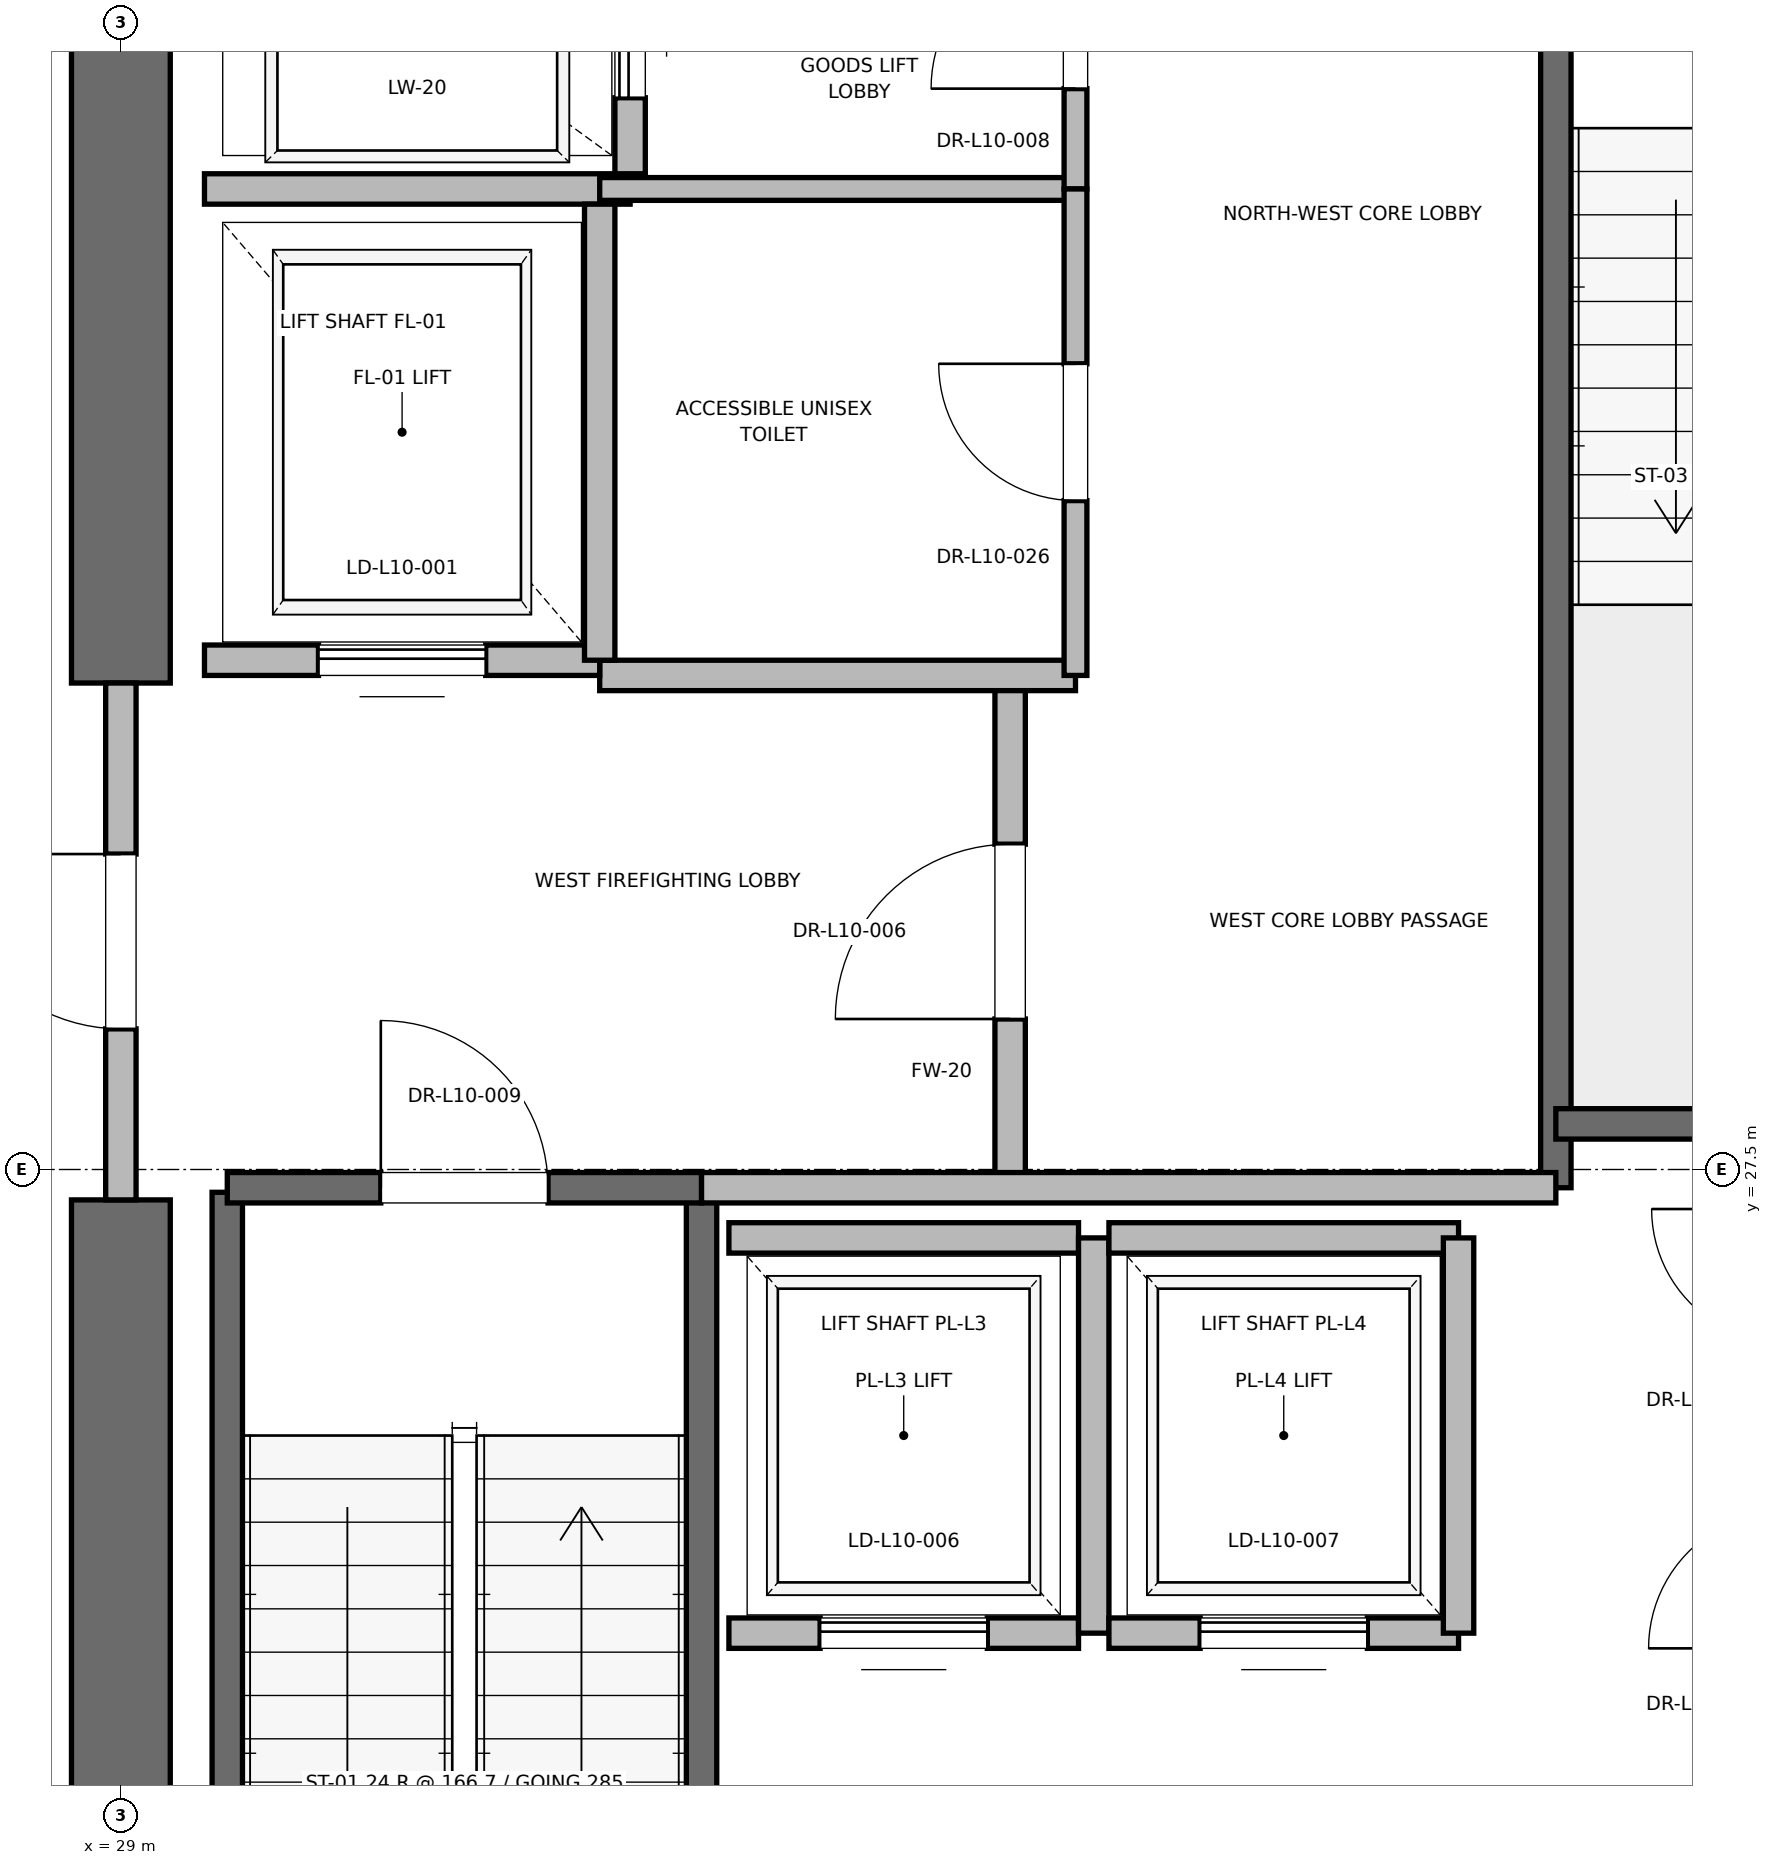
"""IFC4 building model, lengths in metres.
Left out: names, types, materials, properties, quantities, classifications, styles, units other than length and angle.
Written with IfcOpenShell. Run it as: python <this file> out.ifc"""

import sys

from ifc_helpers import new_model, si_unit, direction, frame, frame_2d, origin, place, context, subcontext, project, spatial, rectangle, extrude, element, fill, save


model = new_model("IFC4")
c1 = context("Model", 3, precision=1e-05, world=origin(), true_north=direction((0.0, 1.0)))
c2 = subcontext(c1, "Body", "Model", "MODEL_VIEW")
j1 = project(units=[si_unit("LENGTHUNIT", "METRE"), si_unit("PLANEANGLEUNIT", "RADIAN")], contexts=[c1])
p1 = place(None, origin())
s1 = spatial("IfcSite", under=j1, at=p1, CompositionType="ELEMENT")
p2 = place(p1, origin())
s2 = spatial("IfcBuilding", under=s1, at=p2, CompositionType="ELEMENT")
p3 = place(p2, frame((0.0, 0.0, 47.6)))
s3 = spatial("IfcBuildingStorey", under=s2, at=p3, CompositionType="ELEMENT", Elevation=47.6)
p4 = place(p3, frame((29.0, 18.5, 0.0), z_axis=(0.0, 0.0, 1.0), x_axis=(0.0, 1.0, 0.0)))
e1 = element("IfcWall", 1, at=p4, inside=s3, PredefinedType="SHEAR", context=c2, shape_type="SweptSolid", body=[
    extrude(rectangle(XDim=8.8, YDim=0.65, at=frame_2d((4.4, 0.0))), origin(), (0.0, 0.0, 1.0), 3.76),
])
p5 = place(p3, frame((29.0, 30.7, 0.0), z_axis=(0.0, 0.0, 1.0), x_axis=(0.0, 1.0, 0.0)))
e2 = element("IfcWall", 2, at=p5, inside=s3, PredefinedType="SHEAR", context=c2, shape_type="SweptSolid", body=[
    extrude(rectangle(XDim=5.8, YDim=0.65, at=frame_2d((2.9, 0.0))), origin(), (0.0, 0.0, 1.0), 3.76),
])
p6 = place(p3, frame((29.7, 19.2, 0.0), z_axis=(0.0, 0.0, 1.0), x_axis=(0.0, 1.0, 0.0)))
e3 = element("IfcWall", 3, at=p6, inside=s3, PredefinedType="SOLIDWALL", context=c2, shape_type="SweptSolid", body=[
    extrude(rectangle(XDim=8.15, YDim=0.2, at=frame_2d((4.075, 0.0))), origin(), (0.0, 0.0, 1.0), 3.76),
])
p7 = place(p3, frame((32.82, 18.6, 0.0), z_axis=(0.0, 0.0, 1.0), x_axis=(0.0, 1.0, 0.0)))
e4 = element("IfcWall", 4, at=p7, inside=s3, PredefinedType="SOLIDWALL", context=c2, shape_type="SweptSolid", body=[
    extrude(rectangle(XDim=8.78, YDim=0.2, at=frame_2d((4.39, 0.0))), origin(), (0.0, 0.0, 1.0), 3.76),
])
p8 = place(p3, frame((29.7, 27.38, 0.0), z_axis=(0.0, 0.0, 1.0), x_axis=(1.0, 0.0, 0.0)))
e5 = element("IfcWall", 5, at=p8, inside=s3, PredefinedType="SOLIDWALL", context=c2, shape_type="SweptSolid", body=[
    extrude(rectangle(XDim=3.12, YDim=0.2, at=frame_2d((1.56, 0.0))), origin(), (0.0, 0.0, 1.0), 3.76),
])
p9 = place(p8, frame((1.01, 0.0, 0.0)))
e6 = element("IfcOpeningElement", 6, at=p9, cuts=e5, PredefinedType="OPENING", context=c2, shape_type="SweptSolid", body=[
    extrude(rectangle(XDim=1.1, YDim=2.15, at=frame_2d((0.55, 1.075))), frame((0.0, 0.1, 0.0), z_axis=(0.0, -1.0, 0.0), x_axis=(1.0, 0.0, 0.0)), (0.0, 0.0, 1.0), 0.2),
])
p10 = place(p3, frame((38.44, 27.38, 0.0), z_axis=(0.0, 0.0, 1.0), x_axis=(0.0, 1.0, 0.0)))
e7 = element("IfcWall", 7, at=p10, inside=s3, PredefinedType="SOLIDWALL", context=c2, shape_type="SweptSolid", body=[
    extrude(rectangle(XDim=8.87, YDim=0.2, at=frame_2d((4.435, 0.0))), origin(), (0.0, 0.0, 1.0), 3.76),
])
p11 = place(p3, frame((38.44, 27.8, 0.0), z_axis=(0.0, 0.0, 1.0), x_axis=(1.0, 0.0, 0.0)))
e8 = element("IfcWall", 8, at=p11, inside=s3, PredefinedType="SOLIDWALL", context=c2, shape_type="SweptSolid", body=[
    extrude(rectangle(XDim=3.32, YDim=0.2, at=frame_2d((1.66, 0.0))), origin(), (0.0, 0.0, 1.0), 3.76),
])
p12 = place(p3, frame((34.85, 27.38, 0.0), z_axis=(0.0, 0.0, 1.0), x_axis=(0.0, 1.0, 0.0)))
e9 = element("IfcWall", 9, at=p12, inside=s3, PredefinedType="PARTITIONING", context=c2, shape_type="SweptSolid", body=[
    extrude(rectangle(XDim=3.37, YDim=0.2, at=frame_2d((1.685, 0.0))), origin(), (0.0, 0.0, 1.0), 3.76),
])
p13 = place(p12, frame((1.11, 0.0, 0.0)))
e10 = element("IfcOpeningElement", 10, at=p13, cuts=e9, PredefinedType="OPENING", context=c2, shape_type="SweptSolid", body=[
    extrude(rectangle(XDim=1.15, YDim=2.2, at=frame_2d((0.575, 1.1))), frame((0.0, 0.1, 0.0), z_axis=(0.0, -1.0, 0.0), x_axis=(1.0, 0.0, 0.0)), (0.0, 0.0, 1.0), 0.2),
])
p14 = place(p3, frame((29.0, 27.3, 0.0), z_axis=(0.0, 0.0, 1.0), x_axis=(0.0, 1.0, 0.0)))
e11 = element("IfcWall", 11, at=p14, inside=s3, PredefinedType="PARTITIONING", context=c2, shape_type="SweptSolid", body=[
    extrude(rectangle(XDim=3.4, YDim=0.2, at=frame_2d((1.7, 0.0))), origin(), (0.0, 0.0, 1.0), 2.54),
])
p15 = place(p14, frame((1.125, 0.0, 0.0)))
e12 = element("IfcOpeningElement", 12, at=p15, cuts=e11, PredefinedType="OPENING", context=c2, shape_type="SweptSolid", body=[
    extrude(rectangle(XDim=1.15, YDim=2.2, at=frame_2d((0.575, 1.1))), frame((0.0, 0.1, 0.0), z_axis=(0.0, -1.0, 0.0), x_axis=(1.0, 0.0, 0.0)), (0.0, 0.0, 1.0), 0.2),
])
p16 = place(p3, frame((32.82, 27.38, 0.0), z_axis=(0.0, 0.0, 1.0), x_axis=(1.0, 0.0, 0.0)))
e13 = element("IfcWall", 13, at=p16, inside=s3, PredefinedType="PARTITIONING", context=c2, shape_type="SweptSolid", body=[
    extrude(rectangle(XDim=5.62, YDim=0.2, at=frame_2d((2.81, 0.0))), origin(), (0.0, 0.0, 1.0), 3.76),
])
p17 = place(p3, frame((32.15, 30.75, 0.0), z_axis=(0.0, 0.0, 1.0), x_axis=(1.0, 0.0, 0.0)))
e14 = element("IfcWall", 14, at=p17, inside=s3, PredefinedType="PARTITIONING", context=c2, shape_type="SweptSolid", body=[
    extrude(rectangle(XDim=3.13, YDim=0.2, at=frame_2d((1.565, 0.0))), origin(), (0.0, 0.0, 1.0), 3.76),
])
p18 = place(p3, frame((29.55, 30.85, 0.0), z_axis=(0.0, 0.0, 1.0), x_axis=(1.0, 0.0, 0.0)))
e15 = element("IfcWall", 15, at=p18, inside=s3, PredefinedType="SOLIDWALL", context=c2, shape_type="SweptSolid", body=[
    extrude(rectangle(XDim=2.6, YDim=0.2, at=frame_2d((1.3, 0.0))), origin(), (0.0, 0.0, 1.0), 2.54),
])
p19 = place(p18, frame((0.75, 0.0, 0.0)))
e16 = element("IfcOpeningElement", 16, at=p19, cuts=e15, PredefinedType="OPENING", context=c2, shape_type="SweptSolid", body=[
    extrude(rectangle(XDim=1.1, YDim=2.2, at=frame_2d((0.55, 1.1))), frame((0.0, 0.1, 0.0), z_axis=(0.0, -1.0, 0.0), x_axis=(1.0, 0.0, 0.0)), (0.0, 0.0, 1.0), 0.2),
])
p20 = place(p3, frame((29.55, 33.95, 0.0), z_axis=(0.0, 0.0, 1.0), x_axis=(1.0, 0.0, 0.0)))
e17 = element("IfcWall", 17, at=p20, inside=s3, PredefinedType="SOLIDWALL", context=c2, shape_type="SweptSolid", body=[
    extrude(rectangle(XDim=2.8, YDim=0.2, at=frame_2d((1.4, 0.0))), origin(), (0.0, 0.0, 1.0), 3.76),
])
p21 = place(p3, frame((32.15, 30.85, 0.0), z_axis=(0.0, 0.0, 1.0), x_axis=(0.0, 1.0, 0.0)))
e18 = element("IfcWall", 18, at=p21, inside=s3, PredefinedType="SOLIDWALL", context=c2, shape_type="SweptSolid", body=[
    extrude(rectangle(XDim=3.0, YDim=0.2, at=frame_2d((1.5, 0.0))), origin(), (0.0, 0.0, 1.0), 3.76),
])
p22 = place(p3, frame((32.35, 34.05, 0.0), z_axis=(0.0, 0.0, 1.0), x_axis=(0.0, 1.0, 0.0)))
e19 = element("IfcWall", 19, at=p22, inside=s3, PredefinedType="SOLIDWALL", context=c2, shape_type="SweptSolid", body=[
    extrude(rectangle(XDim=2.1, YDim=0.2, at=frame_2d((1.05, 0.0))), origin(), (0.0, 0.0, 1.0), 3.76),
])
p23 = place(p22, frame((0.5, 0.0, 0.0)))
e20 = element("IfcOpeningElement", 20, at=p23, cuts=e19, PredefinedType="OPENING", context=c2, shape_type="SweptSolid", body=[
    extrude(rectangle(XDim=1.1, YDim=2.2, at=frame_2d((0.55, 1.1))), frame((0.0, 0.1, 0.0), z_axis=(0.0, -1.0, 0.0), x_axis=(1.0, 0.0, 0.0)), (0.0, 0.0, 1.0), 0.2),
])
p24 = place(p3, frame((33.0, 24.45, 0.0), z_axis=(0.0, 0.0, 1.0), x_axis=(1.0, 0.0, 0.0)))
e21 = element("IfcWall", 21, at=p24, inside=s3, PredefinedType="SOLIDWALL", context=c2, shape_type="SweptSolid", body=[
    extrude(rectangle(XDim=2.3, YDim=0.2, at=frame_2d((1.15, 0.0))), origin(), (0.0, 0.0, 1.0), 3.76),
])
p25 = place(p24, frame((0.6, 0.0, 0.0)))
e22 = element("IfcOpeningElement", 22, at=p25, cuts=e21, PredefinedType="OPENING", context=c2, shape_type="SweptSolid", body=[
    extrude(rectangle(XDim=1.1, YDim=2.2, at=frame_2d((0.55, 1.1))), frame((0.0, 0.1, 0.0), z_axis=(0.0, -1.0, 0.0), x_axis=(1.0, 0.0, 0.0)), (0.0, 0.0, 1.0), 0.2),
])
p26 = place(p3, frame((35.3, 27.05, 0.0), z_axis=(0.0, 0.0, 1.0), x_axis=(-1.0, 0.0, 0.0)))
e23 = element("IfcWall", 23, at=p26, inside=s3, PredefinedType="SOLIDWALL", context=c2, shape_type="SweptSolid", body=[
    extrude(rectangle(XDim=2.3, YDim=0.2, at=frame_2d((1.15, 0.0))), origin(), (0.0, 0.0, 1.0), 3.76),
])
p27 = place(p3, frame((35.4, 24.45, 0.0), z_axis=(0.0, 0.0, 1.0), x_axis=(0.0, 1.0, 0.0)))
e24 = element("IfcWall", 24, at=p27, inside=s3, PredefinedType="SOLIDWALL", context=c2, shape_type="SweptSolid", body=[
    extrude(rectangle(XDim=2.6, YDim=0.2, at=frame_2d((1.3, 0.0))), origin(), (0.0, 0.0, 1.0), 3.76),
])
p28 = place(p3, frame((35.5, 24.45, 0.0), z_axis=(0.0, 0.0, 1.0), x_axis=(1.0, 0.0, 0.0)))
e25 = element("IfcWall", 25, at=p28, inside=s3, PredefinedType="SOLIDWALL", context=c2, shape_type="SweptSolid", body=[
    extrude(rectangle(XDim=2.3, YDim=0.2, at=frame_2d((1.15, 0.0))), origin(), (0.0, 0.0, 1.0), 3.76),
])
p29 = place(p28, frame((0.6, 0.0, 0.0)))
e26 = element("IfcOpeningElement", 26, at=p29, cuts=e25, PredefinedType="OPENING", context=c2, shape_type="SweptSolid", body=[
    extrude(rectangle(XDim=1.1, YDim=2.2, at=frame_2d((0.55, 1.1))), frame((0.0, 0.1, 0.0), z_axis=(0.0, -1.0, 0.0), x_axis=(1.0, 0.0, 0.0)), (0.0, 0.0, 1.0), 0.2),
])
p30 = place(p3, frame((37.8, 27.05, 0.0), z_axis=(0.0, 0.0, 1.0), x_axis=(-1.0, 0.0, 0.0)))
e27 = element("IfcWall", 27, at=p30, inside=s3, PredefinedType="SOLIDWALL", context=c2, shape_type="SweptSolid", body=[
    extrude(rectangle(XDim=2.3, YDim=0.2, at=frame_2d((1.15, 0.0))), origin(), (0.0, 0.0, 1.0), 3.76),
])
p31 = place(p3, frame((37.8, 24.45, 0.0), z_axis=(0.0, 0.0, 1.0), x_axis=(0.0, 1.0, 0.0)))
e28 = element("IfcWall", 28, at=p31, inside=s3, PredefinedType="SOLIDWALL", context=c2, shape_type="SweptSolid", body=[
    extrude(rectangle(XDim=2.6, YDim=0.2, at=frame_2d((1.3, 0.0))), origin(), (0.0, 0.0, 1.0), 3.76),
])
p32 = place(p3, frame((32.15, 33.95, 0.0), z_axis=(0.0, 0.0, 1.0), x_axis=(1.0, 0.0, 0.0)))
e29 = element("IfcWall", 29, at=p32, inside=s3, PredefinedType="PARTITIONING", context=c2, shape_type="SweptSolid", body=[
    extrude(rectangle(XDim=3.13, YDim=0.15, at=frame_2d((1.565, 0.0))), origin(), (0.0, 0.0, 1.0), 2.85),
])
p33 = place(p3, frame((35.28, 33.95, 0.0), z_axis=(0.0, 0.0, 1.0), x_axis=(0.0, 1.0, 0.0)))
e30 = element("IfcWall", 30, at=p33, inside=s3, PredefinedType="PARTITIONING", context=c2, shape_type="SweptSolid", body=[
    extrude(rectangle(XDim=2.27, YDim=0.15, at=frame_2d((1.135, 0.0))), origin(), (0.0, 0.0, 1.0), 2.54),
])
p34 = place(p33, frame((0.66, 0.0, 0.0)))
e31 = element("IfcOpeningElement", 31, at=p34, cuts=e30, PredefinedType="OPENING", context=c2, shape_type="SweptSolid", body=[
    extrude(rectangle(XDim=0.95, YDim=2.15, at=frame_2d((0.475, 1.075))), frame((0.0, 0.075, 0.0), z_axis=(0.0, -1.0, 0.0), x_axis=(1.0, 0.0, 0.0)), (0.0, 0.0, 1.0), 0.15),
])
p35 = place(p3, frame((35.28, 30.75, 0.0), z_axis=(0.0, 0.0, 1.0), x_axis=(0.0, 1.0, 0.0)))
e32 = element("IfcWall", 32, at=p35, inside=s3, PredefinedType="PARTITIONING", context=c2, shape_type="SweptSolid", body=[
    extrude(rectangle(XDim=3.2, YDim=0.15, at=frame_2d((1.6, 0.0))), origin(), (0.0, 0.0, 1.0), 2.85),
])
p36 = place(p35, frame((1.15, 0.0, 0.0)))
e33 = element("IfcOpeningElement", 33, at=p36, cuts=e32, PredefinedType="OPENING", context=c2, shape_type="SweptSolid", body=[
    extrude(rectangle(XDim=0.9, YDim=2.1, at=frame_2d((0.45, 1.05))), frame((0.0, 0.075, 0.0), z_axis=(0.0, -1.0, 0.0), x_axis=(1.0, 0.0, 0.0)), (0.0, 0.0, 1.0), 0.15),
])
p37 = place(p9, origin())
e34 = element("IfcDoor", 34, at=p37, inside=s3, OperationType="SINGLE_SWING_LEFT", PredefinedType="DOOR", context=c2, shape_type="SweptSolid", body=[
    extrude(rectangle(XDim=1.1, YDim=2.15, at=frame_2d((0.55, 1.075))), frame((0.0, 0.025, 0.0), z_axis=(0.0, -1.0, 0.0), x_axis=(1.0, 0.0, 0.0)), (0.0, 0.0, 1.0), 0.05),
])
fill(e6, e34)
p38 = place(p13, origin())
e35 = element("IfcDoor", 35, at=p38, inside=s3, OperationType="SINGLE_SWING_LEFT", PredefinedType="DOOR", context=c2, shape_type="SweptSolid", body=[
    extrude(rectangle(XDim=1.15, YDim=2.2, at=frame_2d((0.575, 1.1))), frame((0.0, 0.025, 0.0), z_axis=(0.0, -1.0, 0.0), x_axis=(1.0, 0.0, 0.0)), (0.0, 0.0, 1.0), 0.05),
])
fill(e10, e35)
p39 = place(p15, origin())
e36 = element("IfcDoor", 36, at=p39, inside=s3, OperationType="SINGLE_SWING_RIGHT", PredefinedType="DOOR", context=c2, shape_type="SweptSolid", body=[
    extrude(rectangle(XDim=1.15, YDim=2.2, at=frame_2d((0.575, 1.1))), frame((0.0, 0.025, 0.0), z_axis=(0.0, -1.0, 0.0), x_axis=(1.0, 0.0, 0.0)), (0.0, 0.0, 1.0), 0.05),
])
fill(e12, e36)
p40 = place(p19, origin())
e37 = element("IfcDoor", 37, at=p40, inside=s3, OperationType="SLIDING_TO_RIGHT", PredefinedType="DOOR", context=c2, shape_type="SweptSolid", body=[
    extrude(rectangle(XDim=1.1, YDim=2.2, at=frame_2d((0.55, 1.1))), frame((0.0, 0.025, 0.0), z_axis=(0.0, -1.0, 0.0), x_axis=(1.0, 0.0, 0.0)), (0.0, 0.0, 1.0), 0.05),
])
fill(e16, e37)
p41 = place(p23, origin())
e38 = element("IfcDoor", 38, at=p41, inside=s3, OperationType="SLIDING_TO_RIGHT", PredefinedType="DOOR", context=c2, shape_type="SweptSolid", body=[
    extrude(rectangle(XDim=1.1, YDim=2.2, at=frame_2d((0.55, 1.1))), frame((0.0, 0.025, 0.0), z_axis=(0.0, -1.0, 0.0), x_axis=(1.0, 0.0, 0.0)), (0.0, 0.0, 1.0), 0.05),
])
fill(e20, e38)
p42 = place(p25, origin())
e39 = element("IfcDoor", 39, at=p42, inside=s3, OperationType="SLIDING_TO_RIGHT", PredefinedType="DOOR", context=c2, shape_type="SweptSolid", body=[
    extrude(rectangle(XDim=1.1, YDim=2.2, at=frame_2d((0.55, 1.1))), frame((0.0, 0.025, 0.0), z_axis=(0.0, -1.0, 0.0), x_axis=(1.0, 0.0, 0.0)), (0.0, 0.0, 1.0), 0.05),
])
fill(e22, e39)
p43 = place(p29, origin())
e40 = element("IfcDoor", 40, at=p43, inside=s3, OperationType="SLIDING_TO_RIGHT", PredefinedType="DOOR", context=c2, shape_type="SweptSolid", body=[
    extrude(rectangle(XDim=1.1, YDim=2.2, at=frame_2d((0.55, 1.1))), frame((0.0, 0.025, 0.0), z_axis=(0.0, -1.0, 0.0), x_axis=(1.0, 0.0, 0.0)), (0.0, 0.0, 1.0), 0.05),
])
fill(e26, e40)
p44 = place(p34, origin())
e41 = element("IfcDoor", 41, at=p44, inside=s3, OperationType="SINGLE_SWING_LEFT", PredefinedType="DOOR", context=c2, shape_type="SweptSolid", body=[
    extrude(rectangle(XDim=0.95, YDim=2.15, at=frame_2d((0.475, 1.075))), frame((0.0, 0.025, 0.0), z_axis=(0.0, -1.0, 0.0), x_axis=(1.0, 0.0, 0.0)), (0.0, 0.0, 1.0), 0.05),
])
fill(e31, e41)
p45 = place(p36, origin())
e42 = element("IfcDoor", 42, at=p45, inside=s3, OperationType="SINGLE_SWING_RIGHT", PredefinedType="DOOR", context=c2, shape_type="SweptSolid", body=[
    extrude(rectangle(XDim=0.9, YDim=2.1, at=frame_2d((0.45, 1.05))), frame((0.0, 0.025, 0.0), z_axis=(0.0, -1.0, 0.0), x_axis=(1.0, 0.0, 0.0)), (0.0, 0.0, 1.0), 0.05),
])
fill(e33, e42)
save(model, sys.argv[1])
